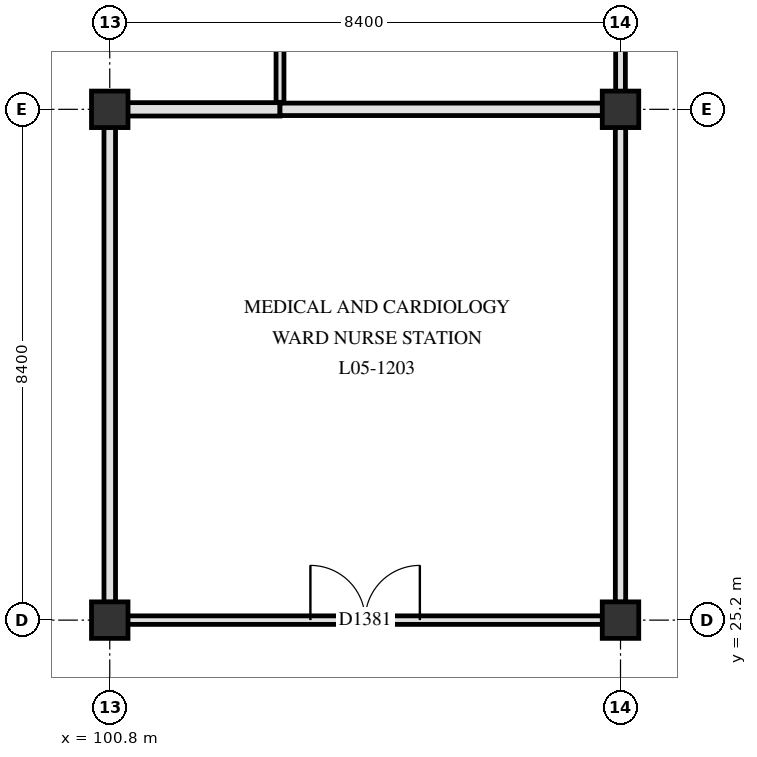
"""IFC4 building model, lengths in metres.
Left out: names, types, materials, properties, quantities, classifications, styles, units other than length and angle.
Written with IfcOpenShell. Run it as: python <this file> out.ifc"""

import sys

from ifc_helpers import new_model, si_unit, direction, frame, frame_2d, origin, origin_2d, place, context, subcontext, project, spatial, rectangle, extrude, element, fill, save


model = new_model("IFC4")
c1 = context("Model", 3, precision=1e-05, world=origin(), true_north=direction((0.0, 1.0)))
c2 = subcontext(c1, "Body", "Model", "MODEL_VIEW")
j1 = project(units=[si_unit("LENGTHUNIT", "METRE"), si_unit("PLANEANGLEUNIT", "RADIAN")], contexts=[c1])
p1 = place(None, origin())
s1 = spatial("IfcSite", under=j1, at=p1, CompositionType="ELEMENT")
p2 = place(p1, origin())
s2 = spatial("IfcBuilding", under=s1, at=p2, CompositionType="ELEMENT")
p3 = place(p2, frame((0.0, 0.0, 22.5)))
s3 = spatial("IfcBuildingStorey", under=s2, at=p3, CompositionType="ELEMENT", Elevation=22.5)
for number, where, z_axis, x_axis in (
    (1, (100.8, 25.2, 0.0), (0.0, 0.0, 1.0), (1.0, 0.0, 0.0)),
    (2, (100.8, 33.6, 0.0), (0.0, 0.0, 1.0), (1.0, 0.0, 0.0)),
    (3, (109.2, 25.2, 0.0), (0.0, 0.0, 1.0), (1.0, 0.0, 0.0)),
    (4, (109.2, 33.6, 0.0), (0.0, 0.0, 1.0), (1.0, 0.0, 0.0)),
):
    element("IfcColumn", number, at=place(p3, frame(where, z_axis=z_axis, x_axis=x_axis)), inside=s3, PredefinedType="COLUMN", context=c2, shape_type="SweptSolid", body=[
        extrude(rectangle(XDim=0.6, YDim=0.6, at=origin_2d()), origin(), (0.0, 0.0, 1.0), 3.9),
    ])
p4 = place(p3, frame((101.095, 25.2, 0.0), z_axis=(0.0, 0.0, 1.0), x_axis=(1.0, 0.0, 0.0)))
e5 = element("IfcWall", 5, at=p4, inside=s3, PredefinedType="PARTITIONING", context=c2, shape_type="SweptSolid", body=[
    extrude(rectangle(XDim=7.81, YDim=0.14, at=frame_2d((3.905, 0.0))), origin(), (0.0, 0.0, 1.0), 3.16),
])
p5 = place(p4, frame((3.005, 0.0, 0.0)))
e6 = element("IfcOpeningElement", 6, at=p5, cuts=e5, PredefinedType="OPENING", context=c2, shape_type="SweptSolid", body=[
    extrude(rectangle(XDim=1.8, YDim=2.25, at=frame_2d((0.9, 1.125))), frame((0.0, 0.08, 0.0), z_axis=(0.0, -1.0, 0.0), x_axis=(1.0, 0.0, 0.0)), (0.0, 0.0, 1.0), 0.16),
])
p6 = place(p3, frame((101.095, 33.6, 0.0), z_axis=(0.0, 0.0, 1.0), x_axis=(1.0, 0.0, 0.0)))
e7 = element("IfcWall", 7, at=p6, inside=s3, PredefinedType="PARTITIONING", context=c2, shape_type="SweptSolid", body=[
    extrude(rectangle(XDim=2.505, YDim=0.22, at=frame_2d((1.252, 0.0))), origin(), (0.0, 0.0, 1.0), 3.16),
])
p7 = place(p3, frame((103.6, 33.6, 0.0), z_axis=(0.0, 0.0, 1.0), x_axis=(1.0, 0.0, 0.0)))
e8 = element("IfcWall", 8, at=p7, inside=s3, PredefinedType="PARTITIONING", context=c2, shape_type="SweptSolid", body=[
    extrude(rectangle(XDim=5.305, YDim=0.205, at=frame_2d((2.652, 0.0))), origin(), (0.0, 0.0, 1.0), 3.16),
])
p8 = place(p3, frame((100.8, 25.495, 0.0), z_axis=(0.0, 0.0, 1.0), x_axis=(0.0, 1.0, 0.0)))
e9 = element("IfcWall", 9, at=p8, inside=s3, PredefinedType="PARTITIONING", context=c2, shape_type="SweptSolid", body=[
    extrude(rectangle(XDim=7.81, YDim=0.19, at=frame_2d((3.905, 0.0))), origin(), (0.0, 0.0, 1.0), 3.3),
])
p9 = place(p3, frame((103.6, 33.715, 0.0), z_axis=(0.0, 0.0, 1.0), x_axis=(0.0, 1.0, 0.0)))
e10 = element("IfcWall", 10, at=p9, inside=s3, PredefinedType="PARTITIONING", context=c2, shape_type="SweptSolid", body=[
    extrude(rectangle(XDim=3.97, YDim=0.13, at=frame_2d((1.985, 0.0))), origin(), (0.0, 0.0, 1.0), 3.34),
])
p10 = place(p9, frame((1.035, 0.0, 0.0)))
e11 = element("IfcOpeningElement", 11, at=p10, cuts=e10, PredefinedType="OPENING", context=c2, shape_type="SweptSolid", body=[
    extrude(rectangle(XDim=1.9, YDim=2.3, at=frame_2d((0.95, 1.15))), frame((0.0, 0.075, 0.0), z_axis=(0.0, -1.0, 0.0), x_axis=(1.0, 0.0, 0.0)), (0.0, 0.0, 1.0), 0.15),
])
p11 = place(p3, frame((109.2, 25.495, 0.0), z_axis=(0.0, 0.0, 1.0), x_axis=(0.0, 1.0, 0.0)))
e12 = element("IfcWall", 12, at=p11, inside=s3, PredefinedType="PARTITIONING", context=c2, shape_type="SweptSolid", body=[
    extrude(rectangle(XDim=7.81, YDim=0.17, at=frame_2d((3.905, 0.0))), origin(), (0.0, 0.0, 1.0), 3.3),
])
p12 = place(p3, frame((109.2, 33.895, 0.0), z_axis=(0.0, 0.0, 1.0), x_axis=(0.0, 1.0, 0.0)))
e13 = element("IfcWall", 13, at=p12, inside=s3, PredefinedType="PARTITIONING", context=c2, shape_type="SweptSolid", body=[
    extrude(rectangle(XDim=3.79, YDim=0.16, at=frame_2d((1.895, 0.0))), origin(), (0.0, 0.0, 1.0), 3.3),
])
p13 = place(p5, origin())
e14 = element("IfcDoor", 14, at=p13, inside=s3, OperationType="DOUBLE_SWING_RIGHT", PredefinedType="DOOR", context=c2, shape_type="SweptSolid", body=[
    extrude(rectangle(XDim=1.8, YDim=2.25, at=frame_2d((0.9, 1.125))), frame((0.0, 0.025, 0.0), z_axis=(0.0, -1.0, 0.0), x_axis=(1.0, 0.0, 0.0)), (0.0, 0.0, 1.0), 0.05),
])
fill(e6, e14)
save(model, sys.argv[1])
